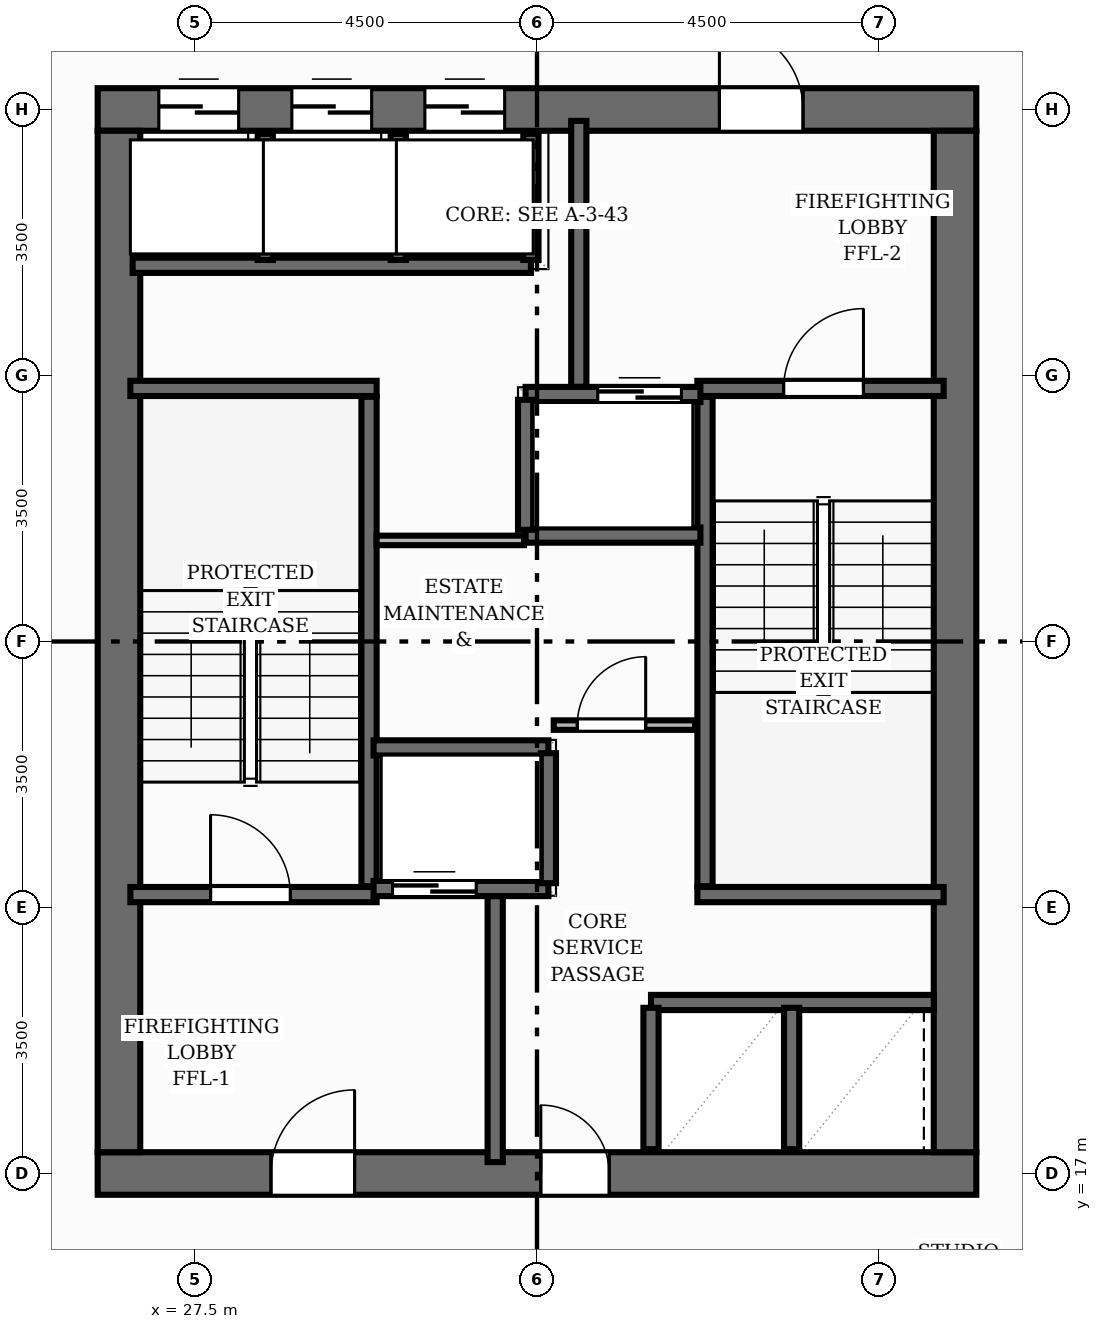
"""IFC4 building model, lengths in metres.
Left out: names, types, materials, properties, quantities, classifications, styles, units other than length and angle.
Written with IfcOpenShell. Run it as: python <this file> out.ifc"""

import sys

from ifc_helpers import new_model, si_unit, direction, frame, frame_2d, origin, place, context, subcontext, project, spatial, rectangle, extrude, element, fill, save


model = new_model("IFC4")
c1 = context("Model", 3, precision=1e-05, world=origin(), true_north=direction((0.0, 1.0)))
c2 = subcontext(c1, "Body", "Model", "MODEL_VIEW")
j1 = project(units=[si_unit("LENGTHUNIT", "METRE"), si_unit("PLANEANGLEUNIT", "RADIAN")], contexts=[c1])
p1 = place(None, origin())
s1 = spatial("IfcSite", under=j1, at=p1, CompositionType="ELEMENT")
p2 = place(p1, origin())
s2 = spatial("IfcBuilding", under=s1, at=p2, CompositionType="ELEMENT")
p3 = place(p2, frame((0.0, 0.0, 175.84)))
s3 = spatial("IfcBuildingStorey", under=s2, at=p3, CompositionType="ELEMENT", Elevation=175.84)
p4 = place(p3, frame((26.22, 17.0, 0.0), z_axis=(0.0, 0.0, 1.0), x_axis=(1.0, 0.0, 0.0)))
e1 = element("IfcWall", 1, at=p4, inside=s3, PredefinedType="SHEAR", context=c2, shape_type="SweptSolid", body=[
    extrude(rectangle(XDim=11.56, YDim=0.56, at=frame_2d((5.78, 0.0))), origin(), (0.0, 0.0, 1.0), 3.2),
])
p5 = place(p4, frame((2.28, 0.0, 0.0)))
e2 = element("IfcOpeningElement", 2, at=p5, cuts=e1, PredefinedType="OPENING", context=c2, shape_type="SweptSolid", body=[
    extrude(rectangle(XDim=1.1, YDim=2.15, at=frame_2d((0.55, 1.075))), frame((0.0, 0.29, 0.0), z_axis=(0.0, -1.0, 0.0), x_axis=(1.0, 0.0, 0.0)), (0.0, 0.0, 1.0), 0.58),
])
p6 = place(p4, frame((5.83, 0.0, 0.0)))
e3 = element("IfcOpeningElement", 3, at=p6, cuts=e1, PredefinedType="OPENING", context=c2, shape_type="SweptSolid", body=[
    extrude(rectangle(XDim=0.9, YDim=2.1, at=frame_2d((0.45, 1.05))), frame((0.0, 0.29, 0.0), z_axis=(0.0, -1.0, 0.0), x_axis=(1.0, 0.0, 0.0)), (0.0, 0.0, 1.0), 0.58),
])
p7 = place(p3, frame((26.22, 31.0, 0.0), z_axis=(0.0, 0.0, 1.0), x_axis=(1.0, 0.0, 0.0)))
e4 = element("IfcWall", 4, at=p7, inside=s3, PredefinedType="SHEAR", context=c2, shape_type="SweptSolid", body=[
    extrude(rectangle(XDim=11.56, YDim=0.56, at=frame_2d((5.78, 0.0))), origin(), (0.0, 0.0, 1.0), 3.2),
])
p8 = place(p7, frame((8.18, 0.0, 0.0)))
e5 = element("IfcOpeningElement", 5, at=p8, cuts=e4, PredefinedType="OPENING", context=c2, shape_type="SweptSolid", body=[
    extrude(rectangle(XDim=1.1, YDim=2.15, at=frame_2d((0.55, 1.075))), frame((0.0, 0.29, 0.0), z_axis=(0.0, -1.0, 0.0), x_axis=(1.0, 0.0, 0.0)), (0.0, 0.0, 1.0), 0.58),
])
p9 = place(p7, frame((0.805, 0.0, 0.0)))
e6 = element("IfcOpeningElement", 6, at=p9, cuts=e4, PredefinedType="OPENING", context=c2, shape_type="SweptSolid", body=[
    extrude(rectangle(XDim=1.05, YDim=2.15, at=frame_2d((0.525, 1.075))), frame((0.0, 0.29, 0.0), z_axis=(0.0, -1.0, 0.0), x_axis=(1.0, 0.0, 0.0)), (0.0, 0.0, 1.0), 0.58),
])
p10 = place(p7, frame((2.555, 0.0, 0.0)))
e7 = element("IfcOpeningElement", 7, at=p10, cuts=e4, PredefinedType="OPENING", context=c2, shape_type="SweptSolid", body=[
    extrude(rectangle(XDim=1.05, YDim=2.15, at=frame_2d((0.525, 1.075))), frame((0.0, 0.29, 0.0), z_axis=(0.0, -1.0, 0.0), x_axis=(1.0, 0.0, 0.0)), (0.0, 0.0, 1.0), 0.58),
])
p11 = place(p7, frame((4.305, 0.0, 0.0)))
e8 = element("IfcOpeningElement", 8, at=p11, cuts=e4, PredefinedType="OPENING", context=c2, shape_type="SweptSolid", body=[
    extrude(rectangle(XDim=1.05, YDim=2.15, at=frame_2d((0.525, 1.075))), frame((0.0, 0.29, 0.0), z_axis=(0.0, -1.0, 0.0), x_axis=(1.0, 0.0, 0.0)), (0.0, 0.0, 1.0), 0.58),
])
for number, where, z_axis, x_axis in (
    (9, (26.5, 17.28, 0.0), (0.0, 0.0, 1.0), (0.0, 1.0, 0.0)),
    (10, (37.5, 17.28, 0.0), (0.0, 0.0, 1.0), (0.0, 1.0, 0.0)),
):
    element("IfcWall", number, at=place(p3, frame(where, z_axis=z_axis, x_axis=x_axis)), inside=s3, PredefinedType="SHEAR", context=c2, shape_type="SweptSolid", body=[
        extrude(rectangle(XDim=13.44, YDim=0.56, at=frame_2d((6.72, 0.0))), origin(), (0.0, 0.0, 1.0), 3.2),
    ])
p12 = place(p3, frame((29.79, 20.78, 0.0), z_axis=(0.0, 0.0, 1.0), x_axis=(0.0, 1.0, 0.0)))
e11 = element("IfcWall", 11, at=p12, inside=s3, PredefinedType="SHEAR", context=c2, shape_type="SweptSolid", body=[
    extrude(rectangle(XDim=6.44, YDim=0.2, at=frame_2d((3.22, 0.0))), origin(), (0.0, 0.0, 1.0), 3.2),
])
p13 = place(p3, frame((26.65, 27.33, 0.0), z_axis=(0.0, 0.0, 1.0), x_axis=(1.0, 0.0, 0.0)))
e12 = element("IfcWall", 12, at=p13, inside=s3, PredefinedType="SHEAR", context=c2, shape_type="SweptSolid", body=[
    extrude(rectangle(XDim=3.24, YDim=0.2, at=frame_2d((1.62, 0.0))), origin(), (0.0, 0.0, 1.0), 3.2),
])
p14 = place(p3, frame((26.65, 20.67, 0.0), z_axis=(0.0, 0.0, 1.0), x_axis=(1.0, 0.0, 0.0)))
e13 = element("IfcWall", 13, at=p14, inside=s3, PredefinedType="SHEAR", context=c2, shape_type="SweptSolid", body=[
    extrude(rectangle(XDim=3.24, YDim=0.2, at=frame_2d((1.62, 0.0))), origin(), (0.0, 0.0, 1.0), 3.2),
])
p15 = place(p14, frame((1.055, 0.0, 0.0)))
e14 = element("IfcOpeningElement", 14, at=p15, cuts=e13, PredefinedType="OPENING", context=c2, shape_type="SweptSolid", body=[
    extrude(rectangle(XDim=1.05, YDim=2.15, at=frame_2d((0.525, 1.075))), frame((0.0, 0.11, 0.0), z_axis=(0.0, -1.0, 0.0), x_axis=(1.0, 0.0, 0.0)), (0.0, 0.0, 1.0), 0.22),
])
p16 = place(p3, frame((34.21, 20.78, 0.0), z_axis=(0.0, 0.0, 1.0), x_axis=(0.0, 1.0, 0.0)))
e15 = element("IfcWall", 15, at=p16, inside=s3, PredefinedType="SHEAR", context=c2, shape_type="SweptSolid", body=[
    extrude(rectangle(XDim=6.44, YDim=0.2, at=frame_2d((3.22, 0.0))), origin(), (0.0, 0.0, 1.0), 3.2),
])
p17 = place(p3, frame((34.11, 20.67, 0.0), z_axis=(0.0, 0.0, 1.0), x_axis=(1.0, 0.0, 0.0)))
e16 = element("IfcWall", 16, at=p17, inside=s3, PredefinedType="SHEAR", context=c2, shape_type="SweptSolid", body=[
    extrude(rectangle(XDim=3.24, YDim=0.2, at=frame_2d((1.62, 0.0))), origin(), (0.0, 0.0, 1.0), 3.2),
])
p18 = place(p3, frame((34.11, 27.33, 0.0), z_axis=(0.0, 0.0, 1.0), x_axis=(1.0, 0.0, 0.0)))
e17 = element("IfcWall", 17, at=p18, inside=s3, PredefinedType="SHEAR", context=c2, shape_type="SweptSolid", body=[
    extrude(rectangle(XDim=3.24, YDim=0.2, at=frame_2d((1.62, 0.0))), origin(), (0.0, 0.0, 1.0), 3.2),
])
p19 = place(p18, frame((1.135, 0.0, 0.0)))
e18 = element("IfcOpeningElement", 18, at=p19, cuts=e17, PredefinedType="OPENING", context=c2, shape_type="SweptSolid", body=[
    extrude(rectangle(XDim=1.05, YDim=2.15, at=frame_2d((0.525, 1.075))), frame((0.0, 0.11, 0.0), z_axis=(0.0, -1.0, 0.0), x_axis=(1.0, 0.0, 0.0)), (0.0, 0.0, 1.0), 0.22),
])
for number, where, z_axis, x_axis in (
    (19, (31.45, 17.15, 0.0), (0.0, 0.0, 1.0), (0.0, 1.0, 0.0)),
    (20, (32.55, 27.35, 0.0), (0.0, 0.0, 1.0), (0.0, 1.0, 0.0)),
):
    element("IfcWall", number, at=place(p3, frame(where, z_axis=z_axis, x_axis=x_axis)), inside=s3, PredefinedType="SHEAR", context=c2, shape_type="SweptSolid", body=[
        extrude(rectangle(XDim=3.5, YDim=0.2, at=frame_2d((1.75, 0.0))), origin(), (0.0, 0.0, 1.0), 3.2),
    ])
p20 = place(p3, frame((29.85, 20.75, 0.0), z_axis=(0.0, 0.0, 1.0), x_axis=(1.0, 0.0, 0.0)))
e21 = element("IfcWall", 21, at=p20, inside=s3, PredefinedType="SHEAR", context=c2, shape_type="SweptSolid", body=[
    extrude(rectangle(XDim=2.3, YDim=0.2, at=frame_2d((1.15, 0.0))), origin(), (0.0, 0.0, 1.0), 3.2),
])
p21 = place(p20, frame((0.25, 0.0, 0.0)))
e22 = element("IfcOpeningElement", 22, at=p21, cuts=e21, PredefinedType="OPENING", context=c2, shape_type="SweptSolid", body=[
    extrude(rectangle(XDim=1.1, YDim=2.15, at=frame_2d((0.55, 1.075))), frame((0.0, 0.11, 0.0), z_axis=(0.0, -1.0, 0.0), x_axis=(1.0, 0.0, 0.0)), (0.0, 0.0, 1.0), 0.22),
])
p22 = place(p3, frame((29.85, 22.6, 0.0), z_axis=(0.0, 0.0, 1.0), x_axis=(1.0, 0.0, 0.0)))
e23 = element("IfcWall", 23, at=p22, inside=s3, PredefinedType="SHEAR", context=c2, shape_type="SweptSolid", body=[
    extrude(rectangle(XDim=2.3, YDim=0.2, at=frame_2d((1.15, 0.0))), origin(), (0.0, 0.0, 1.0), 3.2),
])
p23 = place(p3, frame((32.15, 20.82, 0.0), z_axis=(0.0, 0.0, 1.0), x_axis=(0.0, 1.0, 0.0)))
e24 = element("IfcWall", 24, at=p23, inside=s3, PredefinedType="SHEAR", context=c2, shape_type="SweptSolid", body=[
    extrude(rectangle(XDim=1.71, YDim=0.2, at=frame_2d((0.855, 0.0))), origin(), (0.0, 0.0, 1.0), 3.2),
])
p24 = place(p3, frame((31.85, 27.25, 0.0), z_axis=(0.0, 0.0, 1.0), x_axis=(1.0, 0.0, 0.0)))
e25 = element("IfcWall", 25, at=p24, inside=s3, PredefinedType="SHEAR", context=c2, shape_type="SweptSolid", body=[
    extrude(rectangle(XDim=2.3, YDim=0.2, at=frame_2d((1.15, 0.0))), origin(), (0.0, 0.0, 1.0), 3.2),
])
p25 = place(p24, frame((0.95, 0.0, 0.0)))
e26 = element("IfcOpeningElement", 26, at=p25, cuts=e25, PredefinedType="OPENING", context=c2, shape_type="SweptSolid", body=[
    extrude(rectangle(XDim=1.1, YDim=2.15, at=frame_2d((0.55, 1.075))), frame((0.0, 0.11, 0.0), z_axis=(0.0, -1.0, 0.0), x_axis=(1.0, 0.0, 0.0)), (0.0, 0.0, 1.0), 0.22),
])
p26 = place(p3, frame((31.85, 25.4, 0.0), z_axis=(0.0, 0.0, 1.0), x_axis=(1.0, 0.0, 0.0)))
e27 = element("IfcWall", 27, at=p26, inside=s3, PredefinedType="SHEAR", context=c2, shape_type="SweptSolid", body=[
    extrude(rectangle(XDim=2.3, YDim=0.2, at=frame_2d((1.15, 0.0))), origin(), (0.0, 0.0, 1.0), 3.2),
])
p27 = place(p3, frame((31.85, 25.47, 0.0), z_axis=(0.0, 0.0, 1.0), x_axis=(0.0, 1.0, 0.0)))
e28 = element("IfcWall", 28, at=p27, inside=s3, PredefinedType="SHEAR", context=c2, shape_type="SweptSolid", body=[
    extrude(rectangle(XDim=1.71, YDim=0.2, at=frame_2d((0.855, 0.0))), origin(), (0.0, 0.0, 1.0), 3.2),
])
p28 = place(p3, frame((26.68, 28.95, 0.0), z_axis=(0.0, 0.0, 1.0), x_axis=(1.0, 0.0, 0.0)))
e29 = element("IfcWall", 29, at=p28, inside=s3, PredefinedType="SHEAR", context=c2, shape_type="SweptSolid", body=[
    extrude(rectangle(XDim=5.24, YDim=0.2, at=frame_2d((2.62, 0.0))), origin(), (0.0, 0.0, 1.0), 3.2),
])
for number, where, z_axis, x_axis in (
    (30, (31.92, 29.02, 0.0), (0.0, 0.0, 1.0), (0.0, 1.0, 0.0)),
    (31, (28.425, 29.02, 0.0), (0.0, 0.0, 1.0), (0.0, 1.0, 0.0)),
    (32, (30.175, 29.02, 0.0), (0.0, 0.0, 1.0), (0.0, 1.0, 0.0)),
):
    element("IfcWall", number, at=place(p3, frame(where, z_axis=z_axis, x_axis=x_axis)), inside=s3, PredefinedType="SHEAR", context=c2, shape_type="SweptSolid", body=[
        extrude(rectangle(XDim=1.66, YDim=0.2, at=frame_2d((0.83, 0.0))), origin(), (0.0, 0.0, 1.0), 3.2),
    ])
p29 = place(p3, frame((33.5, 19.25, 0.0), z_axis=(0.0, 0.0, 1.0), x_axis=(1.0, 0.0, 0.0)))
e33 = element("IfcWall", 33, at=p29, inside=s3, PredefinedType="SHEAR", context=c2, shape_type="SweptSolid", body=[
    extrude(rectangle(XDim=3.72, YDim=0.2, at=frame_2d((1.86, 0.0))), origin(), (0.0, 0.0, 1.0), 3.2),
])
for number, where, z_axis, x_axis in (
    (34, (33.5, 17.32, 0.0), (0.0, 0.0, 1.0), (0.0, 1.0, 0.0)),
    (35, (35.35, 17.32, 0.0), (0.0, 0.0, 1.0), (0.0, 1.0, 0.0)),
):
    element("IfcWall", number, at=place(p3, frame(where, z_axis=z_axis, x_axis=x_axis)), inside=s3, PredefinedType="SHEAR", context=c2, shape_type="SweptSolid", body=[
        extrude(rectangle(XDim=1.86, YDim=0.2, at=frame_2d((0.93, 0.0))), origin(), (0.0, 0.0, 1.0), 3.2),
    ])
p30 = place(p3, frame((32.22, 22.9, 0.0), z_axis=(0.0, 0.0, 1.0), x_axis=(1.0, 0.0, 0.0)))
e36 = element("IfcWall", 36, at=p30, inside=s3, PredefinedType="PARTITIONING", context=c2, shape_type="SweptSolid", body=[
    extrude(rectangle(XDim=1.86, YDim=0.125, at=frame_2d((0.93, 0.0))), origin(), (0.0, 0.0, 1.0), 2.955),
])
p31 = place(p30, frame((0.31, 0.0, 0.0)))
e37 = element("IfcOpeningElement", 37, at=p31, cuts=e36, PredefinedType="OPENING", context=c2, shape_type="SweptSolid", body=[
    extrude(rectangle(XDim=0.9, YDim=2.1, at=frame_2d((0.45, 1.05))), frame((0.0, 0.073, 0.0), z_axis=(0.0, -1.0, 0.0), x_axis=(1.0, 0.0, 0.0)), (0.0, 0.0, 1.0), 0.145),
])
p32 = place(p3, frame((29.89, 25.33, 0.0), z_axis=(0.0, 0.0, 1.0), x_axis=(1.0, 0.0, 0.0)))
e38 = element("IfcWall", 38, at=p32, inside=s3, PredefinedType="PARTITIONING", context=c2, shape_type="SweptSolid", body=[
    extrude(rectangle(XDim=1.94, YDim=0.125, at=frame_2d((0.97, 0.0))), origin(), (0.0, 0.0, 1.0), 2.955),
])
p33 = place(p15, origin())
e39 = element("IfcDoor", 39, at=p33, inside=s3, OperationType="SINGLE_SWING_LEFT", PredefinedType="DOOR", context=c2, shape_type="SweptSolid", body=[
    extrude(rectangle(XDim=1.05, YDim=2.15, at=frame_2d((0.525, 1.075))), frame((0.0, 0.025, 0.0), z_axis=(0.0, -1.0, 0.0), x_axis=(1.0, 0.0, 0.0)), (0.0, 0.0, 1.0), 0.05),
])
fill(e14, e39)
p34 = place(p19, origin())
e40 = element("IfcDoor", 40, at=p34, inside=s3, OperationType="SINGLE_SWING_RIGHT", PredefinedType="DOOR", context=c2, shape_type="SweptSolid", body=[
    extrude(rectangle(XDim=1.05, YDim=2.15, at=frame_2d((0.525, 1.075))), frame((0.0, 0.025, 0.0), z_axis=(0.0, -1.0, 0.0), x_axis=(1.0, 0.0, 0.0)), (0.0, 0.0, 1.0), 0.05),
])
fill(e18, e40)
p35 = place(p5, origin())
e41 = element("IfcDoor", 41, at=p35, inside=s3, OperationType="SINGLE_SWING_RIGHT", PredefinedType="DOOR", context=c2, shape_type="SweptSolid", body=[
    extrude(rectangle(XDim=1.1, YDim=2.15, at=frame_2d((0.55, 1.075))), frame((0.0, 0.025, 0.0), z_axis=(0.0, -1.0, 0.0), x_axis=(1.0, 0.0, 0.0)), (0.0, 0.0, 1.0), 0.05),
])
fill(e2, e41)
p36 = place(p8, origin())
e42 = element("IfcDoor", 42, at=p36, inside=s3, OperationType="SINGLE_SWING_LEFT", PredefinedType="DOOR", context=c2, shape_type="SweptSolid", body=[
    extrude(rectangle(XDim=1.1, YDim=2.15, at=frame_2d((0.55, 1.075))), frame((0.0, 0.025, 0.0), z_axis=(0.0, -1.0, 0.0), x_axis=(1.0, 0.0, 0.0)), (0.0, 0.0, 1.0), 0.05),
])
fill(e5, e42)
p37 = place(p21, origin())
e43 = element("IfcDoor", 43, at=p37, inside=s3, OperationType="DOUBLE_DOOR_SLIDING", PredefinedType="DOOR", context=c2, shape_type="SweptSolid", body=[
    extrude(rectangle(XDim=1.1, YDim=2.15, at=frame_2d((0.55, 1.075))), frame((0.0, 0.025, 0.0), z_axis=(0.0, -1.0, 0.0), x_axis=(1.0, 0.0, 0.0)), (0.0, 0.0, 1.0), 0.05),
])
fill(e22, e43)
p38 = place(p25, origin())
e44 = element("IfcDoor", 44, at=p38, inside=s3, OperationType="DOUBLE_DOOR_SLIDING", PredefinedType="DOOR", context=c2, shape_type="SweptSolid", body=[
    extrude(rectangle(XDim=1.1, YDim=2.15, at=frame_2d((0.55, 1.075))), frame((0.0, 0.025, 0.0), z_axis=(0.0, -1.0, 0.0), x_axis=(1.0, 0.0, 0.0)), (0.0, 0.0, 1.0), 0.05),
])
fill(e26, e44)
p39 = place(p9, origin())
e45 = element("IfcDoor", 45, at=p39, inside=s3, OperationType="DOUBLE_DOOR_SLIDING", PredefinedType="DOOR", context=c2, shape_type="SweptSolid", body=[
    extrude(rectangle(XDim=1.05, YDim=2.15, at=frame_2d((0.525, 1.075))), frame((0.0, 0.025, 0.0), z_axis=(0.0, -1.0, 0.0), x_axis=(1.0, 0.0, 0.0)), (0.0, 0.0, 1.0), 0.05),
])
fill(e6, e45)
p40 = place(p10, origin())
e46 = element("IfcDoor", 46, at=p40, inside=s3, OperationType="DOUBLE_DOOR_SLIDING", PredefinedType="DOOR", context=c2, shape_type="SweptSolid", body=[
    extrude(rectangle(XDim=1.05, YDim=2.15, at=frame_2d((0.525, 1.075))), frame((0.0, 0.025, 0.0), z_axis=(0.0, -1.0, 0.0), x_axis=(1.0, 0.0, 0.0)), (0.0, 0.0, 1.0), 0.05),
])
fill(e7, e46)
p41 = place(p11, origin())
e47 = element("IfcDoor", 47, at=p41, inside=s3, OperationType="DOUBLE_DOOR_SLIDING", PredefinedType="DOOR", context=c2, shape_type="SweptSolid", body=[
    extrude(rectangle(XDim=1.05, YDim=2.15, at=frame_2d((0.525, 1.075))), frame((0.0, 0.025, 0.0), z_axis=(0.0, -1.0, 0.0), x_axis=(1.0, 0.0, 0.0)), (0.0, 0.0, 1.0), 0.05),
])
fill(e8, e47)
p42 = place(p6, origin())
e48 = element("IfcDoor", 48, at=p42, inside=s3, OperationType="SINGLE_SWING_LEFT", PredefinedType="DOOR", context=c2, shape_type="SweptSolid", body=[
    extrude(rectangle(XDim=0.9, YDim=2.1, at=frame_2d((0.45, 1.05))), frame((0.0, 0.025, 0.0), z_axis=(0.0, -1.0, 0.0), x_axis=(1.0, 0.0, 0.0)), (0.0, 0.0, 1.0), 0.05),
])
fill(e3, e48)
p43 = place(p31, origin())
e49 = element("IfcDoor", 49, at=p43, inside=s3, OperationType="SINGLE_SWING_RIGHT", PredefinedType="DOOR", context=c2, shape_type="SweptSolid", body=[
    extrude(rectangle(XDim=0.9, YDim=2.1, at=frame_2d((0.45, 1.05))), frame((0.0, 0.025, 0.0), z_axis=(0.0, -1.0, 0.0), x_axis=(1.0, 0.0, 0.0)), (0.0, 0.0, 1.0), 0.05),
])
fill(e37, e49)
save(model, sys.argv[1])
